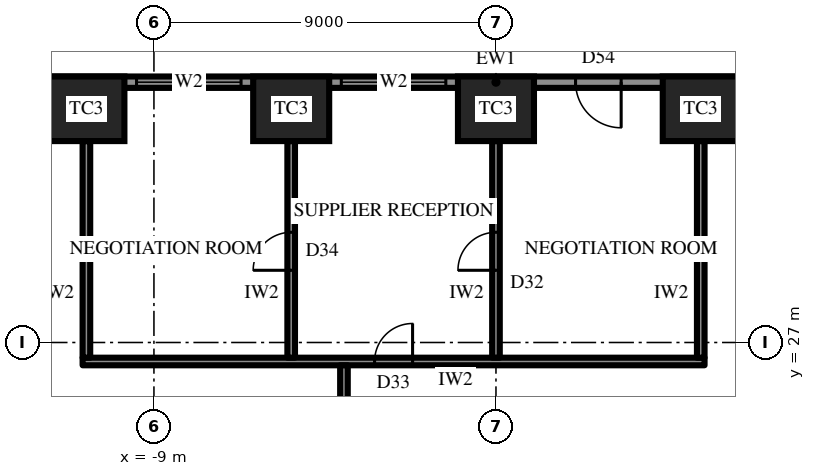
"""IFC4 building model, lengths in metres.
Left out: names, types, materials, properties, quantities, classifications, styles, units other than length and angle.
Written with IfcOpenShell. Run it as: python <this file> out.ifc"""

import sys

from ifc_helpers import new_model, si_unit, direction, frame, frame_2d, origin, origin_2d, place, context, subcontext, project, spatial, rectangle, extrude, element, fill, save


model = new_model("IFC4")
c1 = context("Model", 3, precision=1e-05, world=origin(), true_north=direction((0.0, 1.0)))
c2 = subcontext(c1, "Body", "Model", "MODEL_VIEW")
j1 = project(units=[si_unit("LENGTHUNIT", "METRE"), si_unit("PLANEANGLEUNIT", "RADIAN")], contexts=[c1])
p1 = place(None, origin())
s1 = spatial("IfcSite", under=j1, at=p1, CompositionType="ELEMENT")
p2 = place(p1, origin())
s2 = spatial("IfcBuilding", under=s1, at=p2, CompositionType="ELEMENT")
p3 = place(p2, frame((0.0, 0.0, 69.7)))
s3 = spatial("IfcBuildingStorey", under=s2, at=p3, CompositionType="ELEMENT", Elevation=69.7)
for number, where, z_axis, x_axis in (
    (1, (5.389, 33.15, 0.0), (0.0, 0.0, 1.0), (-1.0, 0.0, 0.0)),
    (2, (0.0, 33.15, 0.0), (0.0, 0.0, 1.0), (-1.0, 0.0, 0.0)),
    (3, (-5.389, 33.15, 0.0), (0.0, 0.0, 1.0), (-1.0, 0.0, 0.0)),
    (4, (-10.777, 33.15, 0.0), (0.0, 0.0, 1.0), (-1.0, 0.0, 0.0)),
):
    element("IfcColumn", number, at=place(p3, frame(where, z_axis=z_axis, x_axis=x_axis)), inside=s3, PredefinedType="COLUMN", context=c2, shape_type="SweptSolid", body=[
        extrude(rectangle(XDim=2.0, YDim=1.7, at=origin_2d()), origin(), (0.0, 0.0, 1.0), 4.2),
    ])
p4 = place(p3, frame((16.166, 33.85, 0.0), z_axis=(0.0, 0.0, 1.0), x_axis=(-1.0, 0.0, 0.0)))
e5 = element("IfcWall", 5, at=p4, inside=s3, PredefinedType="SOLIDWALL", context=c2, shape_type="SweptSolid", body=[
    extrude(rectangle(XDim=32.332, YDim=0.3, at=frame_2d((16.166, 0.0))), origin(), (0.0, 0.0, 1.0), 2.7),
])
p5 = place(p4, frame((1.319, 0.0, 0.6)))
e6 = element("IfcOpeningElement", 6, at=p5, cuts=e5, PredefinedType="OPENING", context=c2, shape_type="SweptSolid", body=[
    extrude(rectangle(XDim=2.75, YDim=1.85, at=frame_2d((1.375, 0.925))), frame((0.0, 0.16, 0.0), z_axis=(0.0, -1.0, 0.0), x_axis=(1.0, 0.0, 0.0)), (0.0, 0.0, 1.0), 0.32),
])
p6 = place(p4, frame((6.708, 0.0, 0.6)))
e7 = element("IfcOpeningElement", 7, at=p6, cuts=e5, PredefinedType="OPENING", context=c2, shape_type="SweptSolid", body=[
    extrude(rectangle(XDim=2.75, YDim=1.85, at=frame_2d((1.375, 0.925))), frame((0.0, 0.16, 0.0), z_axis=(0.0, -1.0, 0.0), x_axis=(1.0, 0.0, 0.0)), (0.0, 0.0, 1.0), 0.32),
])
p7 = place(p4, frame((12.872, 0.0, 0.0)))
e8 = element("IfcOpeningElement", 8, at=p7, cuts=e5, PredefinedType="OPENING", context=c2, shape_type="SweptSolid", body=[
    extrude(rectangle(XDim=1.2, YDim=2.4, at=frame_2d((0.6, 1.2))), frame((0.0, 0.16, 0.0), z_axis=(0.0, -1.0, 0.0), x_axis=(1.0, 0.0, 0.0)), (0.0, 0.0, 1.0), 0.32),
])
p8 = place(p4, frame((17.485, 0.0, 0.6)))
e9 = element("IfcOpeningElement", 9, at=p8, cuts=e5, PredefinedType="OPENING", context=c2, shape_type="SweptSolid", body=[
    extrude(rectangle(XDim=2.75, YDim=1.85, at=frame_2d((1.375, 0.925))), frame((0.0, 0.16, 0.0), z_axis=(0.0, -1.0, 0.0), x_axis=(1.0, 0.0, 0.0)), (0.0, 0.0, 1.0), 0.32),
])
p9 = place(p4, frame((22.874, 0.0, 0.6)))
e10 = element("IfcOpeningElement", 10, at=p9, cuts=e5, PredefinedType="OPENING", context=c2, shape_type="SweptSolid", body=[
    extrude(rectangle(XDim=2.75, YDim=1.85, at=frame_2d((1.375, 0.925))), frame((0.0, 0.16, 0.0), z_axis=(0.0, -1.0, 0.0), x_axis=(1.0, 0.0, 0.0)), (0.0, 0.0, 1.0), 0.32),
])
p10 = place(p4, frame((28.262, 0.0, 0.6)))
e11 = element("IfcOpeningElement", 11, at=p10, cuts=e5, PredefinedType="OPENING", context=c2, shape_type="SweptSolid", body=[
    extrude(rectangle(XDim=2.75, YDim=1.85, at=frame_2d((1.375, 0.925))), frame((0.0, 0.16, 0.0), z_axis=(0.0, -1.0, 0.0), x_axis=(1.0, 0.0, 0.0)), (0.0, 0.0, 1.0), 0.32),
])
p11 = place(p3, frame((5.489, 26.5, 0.0), z_axis=(0.0, 0.0, 1.0), x_axis=(-1.0, 0.0, 0.0)))
e12 = element("IfcWall", 12, at=p11, inside=s3, PredefinedType="PARTITIONING", context=c2, shape_type="SweptSolid", body=[
    extrude(rectangle(XDim=16.366, YDim=0.2, at=frame_2d((8.183, 0.0))), origin(), (0.0, 0.0, 1.0), 4.0),
])
p12 = place(p11, frame((7.683, 0.0, 0.0)))
e13 = element("IfcOpeningElement", 13, at=p12, cuts=e12, PredefinedType="OPENING", context=c2, shape_type="SweptSolid", body=[
    extrude(rectangle(XDim=1.0, YDim=2.2, at=frame_2d((0.5, 1.1))), frame((0.0, 0.11, 0.0), z_axis=(0.0, -1.0, 0.0), x_axis=(1.0, 0.0, 0.0)), (0.0, 0.0, 1.0), 0.22),
])
p13 = place(p3, frame((5.389, 26.6, 0.0), z_axis=(0.0, 0.0, 1.0), x_axis=(0.0, 1.0, 0.0)))
e14 = element("IfcWall", 14, at=p13, inside=s3, PredefinedType="PARTITIONING", context=c2, shape_type="SweptSolid", body=[
    extrude(rectangle(XDim=5.7, YDim=0.2, at=frame_2d((2.85, 0.0))), origin(), (0.0, 0.0, 1.0), 2.944),
])
p14 = place(p3, frame((0.0, 26.6, 0.0), z_axis=(0.0, 0.0, 1.0), x_axis=(0.0, 1.0, 0.0)))
e15 = element("IfcWall", 15, at=p14, inside=s3, PredefinedType="PARTITIONING", context=c2, shape_type="SweptSolid", body=[
    extrude(rectangle(XDim=5.7, YDim=0.2, at=frame_2d((2.85, 0.0))), origin(), (0.0, 0.0, 1.0), 2.944),
])
p15 = place(p14, frame((2.3, 0.0, 0.0)))
e16 = element("IfcOpeningElement", 16, at=p15, cuts=e15, PredefinedType="OPENING", context=c2, shape_type="SweptSolid", body=[
    extrude(rectangle(XDim=1.0, YDim=2.2, at=frame_2d((0.5, 1.1))), frame((0.0, 0.11, 0.0), z_axis=(0.0, -1.0, 0.0), x_axis=(1.0, 0.0, 0.0)), (0.0, 0.0, 1.0), 0.22),
])
p16 = place(p3, frame((-5.389, 26.6, 0.0), z_axis=(0.0, 0.0, 1.0), x_axis=(0.0, 1.0, 0.0)))
e17 = element("IfcWall", 17, at=p16, inside=s3, PredefinedType="PARTITIONING", context=c2, shape_type="SweptSolid", body=[
    extrude(rectangle(XDim=5.7, YDim=0.2, at=frame_2d((2.85, 0.0))), origin(), (0.0, 0.0, 1.0), 2.944),
])
p17 = place(p16, frame((2.3, 0.0, 0.0)))
e18 = element("IfcOpeningElement", 18, at=p17, cuts=e17, PredefinedType="OPENING", context=c2, shape_type="SweptSolid", body=[
    extrude(rectangle(XDim=1.0, YDim=2.2, at=frame_2d((0.5, 1.1))), frame((0.0, 0.11, 0.0), z_axis=(0.0, -1.0, 0.0), x_axis=(1.0, 0.0, 0.0)), (0.0, 0.0, 1.0), 0.22),
])
p18 = place(p3, frame((-10.777, 26.6, 0.0), z_axis=(0.0, 0.0, 1.0), x_axis=(0.0, 1.0, 0.0)))
e19 = element("IfcWall", 19, at=p18, inside=s3, PredefinedType="PARTITIONING", context=c2, shape_type="SweptSolid", body=[
    extrude(rectangle(XDim=5.7, YDim=0.2, at=frame_2d((2.85, 0.0))), origin(), (0.0, 0.0, 1.0), 2.944),
])
p19 = place(p3, frame((-4.0, 14.2, 0.0), z_axis=(0.0, 0.0, 1.0), x_axis=(0.0, 1.0, 0.0)))
e20 = element("IfcWall", 20, at=p19, inside=s3, PredefinedType="PARTITIONING", context=c2, shape_type="SweptSolid", body=[
    extrude(rectangle(XDim=12.2, YDim=0.2, at=frame_2d((6.1, 0.0))), origin(), (0.0, 0.0, 1.0), 4.0),
])
p20 = place(p19, frame((0.72, 0.0, 0.0)))
e21 = element("IfcOpeningElement", 21, at=p20, cuts=e20, PredefinedType="OPENING", context=c2, shape_type="SweptSolid", body=[
    extrude(rectangle(XDim=1.0, YDim=2.2, at=frame_2d((0.5, 1.1))), frame((0.0, 0.11, 0.0), z_axis=(0.0, -1.0, 0.0), x_axis=(1.0, 0.0, 0.0)), (0.0, 0.0, 1.0), 0.22),
])
p21 = place(p7, origin())
e22 = element("IfcDoor", 22, at=p21, inside=s3, OperationType="SINGLE_SWING_RIGHT", PredefinedType="DOOR", context=c2, shape_type="SweptSolid", body=[
    extrude(rectangle(XDim=1.2, YDim=2.4, at=frame_2d((0.6, 1.2))), frame((0.0, 0.025, 0.0), z_axis=(0.0, -1.0, 0.0), x_axis=(1.0, 0.0, 0.0)), (0.0, 0.0, 1.0), 0.05),
])
fill(e8, e22)
p22 = place(p8, origin())
e23 = element("IfcWindow", 23, at=p22, inside=s3, PartitioningType="SINGLE_PANEL", PredefinedType="WINDOW", context=c2, shape_type="SweptSolid", body=[
    extrude(rectangle(XDim=2.75, YDim=1.85, at=frame_2d((1.375, 0.925))), frame((0.0, 0.03, 0.0), z_axis=(0.0, -1.0, 0.0), x_axis=(1.0, 0.0, 0.0)), (0.0, 0.0, 1.0), 0.06),
])
fill(e9, e23)
p23 = place(p9, origin())
e24 = element("IfcWindow", 24, at=p23, inside=s3, PartitioningType="SINGLE_PANEL", PredefinedType="WINDOW", context=c2, shape_type="SweptSolid", body=[
    extrude(rectangle(XDim=2.75, YDim=1.85, at=frame_2d((1.375, 0.925))), frame((0.0, 0.03, 0.0), z_axis=(0.0, -1.0, 0.0), x_axis=(1.0, 0.0, 0.0)), (0.0, 0.0, 1.0), 0.06),
])
fill(e10, e24)
p24 = place(p15, origin())
e25 = element("IfcDoor", 25, at=p24, inside=s3, OperationType="SINGLE_SWING_RIGHT", PredefinedType="DOOR", context=c2, shape_type="SweptSolid", body=[
    extrude(rectangle(XDim=1.0, YDim=2.2, at=frame_2d((0.5, 1.1))), frame((0.0, 0.025, 0.0), z_axis=(0.0, -1.0, 0.0), x_axis=(1.0, 0.0, 0.0)), (0.0, 0.0, 1.0), 0.05),
])
fill(e16, e25)
p25 = place(p12, frame((1.0, 0.0, 0.0), z_axis=(0.0, 0.0, 1.0), x_axis=(-1.0, 0.0, 0.0)))
e26 = element("IfcDoor", 26, at=p25, inside=s3, OperationType="SINGLE_SWING_LEFT", PredefinedType="DOOR", context=c2, shape_type="SweptSolid", body=[
    extrude(rectangle(XDim=1.0, YDim=2.2, at=frame_2d((0.5, 1.1))), frame((0.0, 0.025, 0.0), z_axis=(0.0, -1.0, 0.0), x_axis=(1.0, 0.0, 0.0)), (0.0, 0.0, 1.0), 0.05),
])
fill(e13, e26)
p26 = place(p17, origin())
e27 = element("IfcDoor", 27, at=p26, inside=s3, OperationType="SINGLE_SWING_RIGHT", PredefinedType="DOOR", context=c2, shape_type="SweptSolid", body=[
    extrude(rectangle(XDim=1.0, YDim=2.2, at=frame_2d((0.5, 1.1))), frame((0.0, 0.025, 0.0), z_axis=(0.0, -1.0, 0.0), x_axis=(1.0, 0.0, 0.0)), (0.0, 0.0, 1.0), 0.05),
])
fill(e18, e27)
save(model, sys.argv[1])
